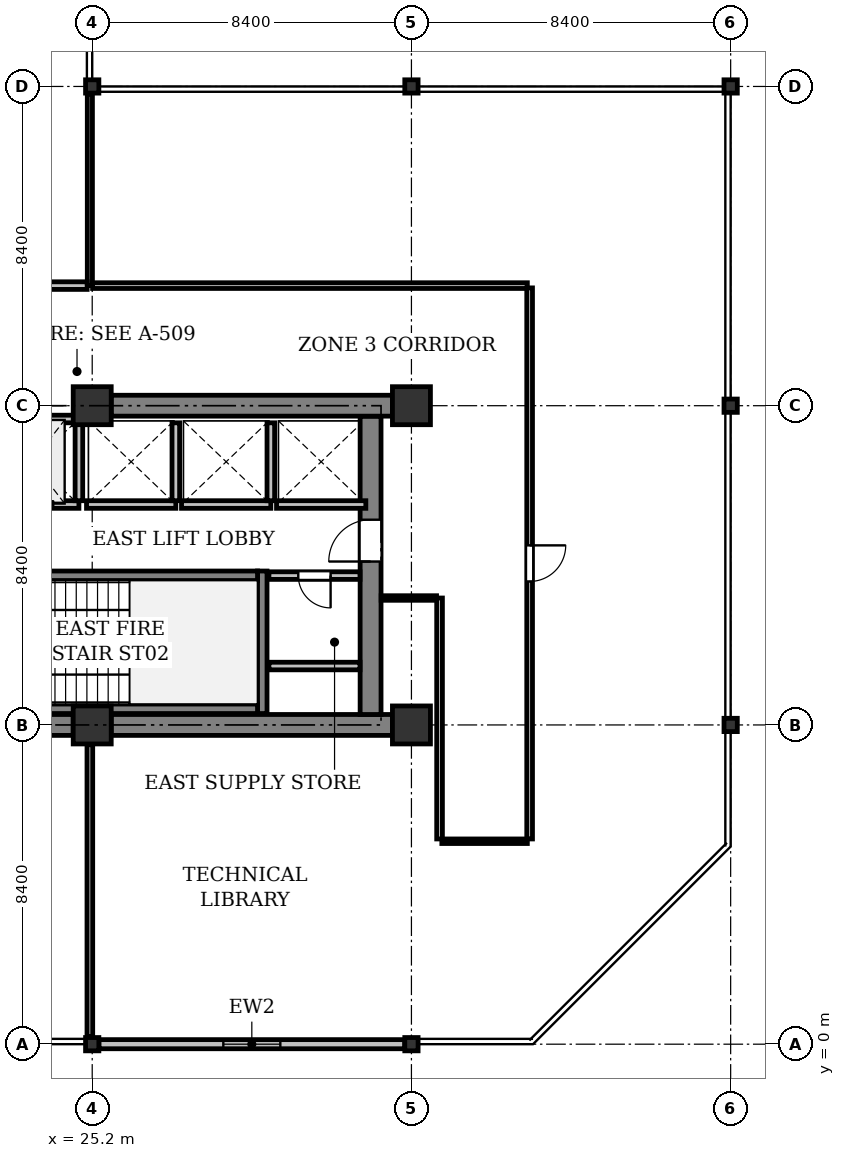
"""IFC4 building model, lengths in metres.
Left out: names, types, materials, properties, quantities, classifications, styles, units other than length and angle.
Written with IfcOpenShell. Run it as: python <this file> out.ifc"""

import sys

from ifc_helpers import new_model, si_unit, direction, frame, frame_2d, origin, origin_2d, place, context, subcontext, project, spatial, rectangle, i_section, extrude, element, fill, save


model = new_model("IFC4")
c1 = context("Model", 3, precision=1e-05, world=origin(), true_north=direction((0.0, 1.0)))
c2 = subcontext(c1, "Body", "Model", "MODEL_VIEW")
j1 = project(units=[si_unit("LENGTHUNIT", "METRE"), si_unit("PLANEANGLEUNIT", "RADIAN")], contexts=[c1])
p1 = place(None, origin())
s1 = spatial("IfcSite", under=j1, at=p1, CompositionType="ELEMENT")
p2 = place(p1, origin())
s2 = spatial("IfcBuilding", under=s1, at=p2, CompositionType="ELEMENT")
p3 = place(p2, frame((0.0, 0.0, 183.7)))
s3 = spatial("IfcBuildingStorey", under=s2, at=p3, CompositionType="ELEMENT", Elevation=183.7)
p4 = place(p3, frame((25.2, 0.0, 0.0), z_axis=(0.0, 0.0, 1.0), x_axis=(1.0, 0.0, 0.0)))
e1 = element("IfcColumn", 1, at=p4, inside=s3, PredefinedType="COLUMN", context=c2, shape_type="SweptSolid", body=[
    extrude(i_section(OverallWidth=0.35, OverallDepth=0.35, WebThickness=0.02, FlangeThickness=0.032, at=origin_2d()), origin(), (0.0, 0.0, 1.0), 4.1),
])
for number, where, z_axis, x_axis in (
    (2, (25.2, 8.4, 0.0), (0.0, 0.0, 1.0), (1.0, 0.0, 0.0)),
    (3, (25.2, 16.8, 0.0), (0.0, 0.0, 1.0), (1.0, 0.0, 0.0)),
):
    element("IfcColumn", number, at=place(p3, frame(where, z_axis=z_axis, x_axis=x_axis)), inside=s3, PredefinedType="COLUMN", context=c2, shape_type="SweptSolid", body=[
        extrude(rectangle(XDim=1.0, YDim=1.0, at=origin_2d()), origin(), (0.0, 0.0, 1.0), 4.1),
    ])
for number, where, z_axis, x_axis in (
    (4, (25.2, 25.2, 0.0), (0.0, 0.0, 1.0), (1.0, 0.0, 0.0)),
    (5, (33.6, 0.0, 0.0), (0.0, 0.0, 1.0), (1.0, 0.0, 0.0)),
):
    element("IfcColumn", number, at=place(p3, frame(where, z_axis=z_axis, x_axis=x_axis)), inside=s3, PredefinedType="COLUMN", context=c2, shape_type="SweptSolid", body=[
        extrude(i_section(OverallWidth=0.35, OverallDepth=0.35, WebThickness=0.02, FlangeThickness=0.032, at=origin_2d()), origin(), (0.0, 0.0, 1.0), 4.1),
    ])
for number, where, z_axis, x_axis in (
    (6, (33.6, 8.4, 0.0), (0.0, 0.0, 1.0), (1.0, 0.0, 0.0)),
    (7, (33.6, 16.8, 0.0), (0.0, 0.0, 1.0), (1.0, 0.0, 0.0)),
):
    element("IfcColumn", number, at=place(p3, frame(where, z_axis=z_axis, x_axis=x_axis)), inside=s3, PredefinedType="COLUMN", context=c2, shape_type="SweptSolid", body=[
        extrude(rectangle(XDim=1.0, YDim=1.0, at=origin_2d()), origin(), (0.0, 0.0, 1.0), 4.1),
    ])
for number, where, z_axis, x_axis in (
    (8, (33.6, 25.2, 0.0), (0.0, 0.0, 1.0), (1.0, 0.0, 0.0)),
    (9, (42.0, 8.4, 0.0), (0.0, 0.0, 1.0), (1.0, 0.0, 0.0)),
    (10, (42.0, 16.8, 0.0), (0.0, 0.0, 1.0), (1.0, 0.0, 0.0)),
    (11, (42.0, 25.2, 0.0), (0.0, 0.0, 1.0), (1.0, 0.0, 0.0)),
):
    element("IfcColumn", number, at=place(p3, frame(where, z_axis=z_axis, x_axis=x_axis)), inside=s3, PredefinedType="COLUMN", context=c2, shape_type="SweptSolid", body=[
        extrude(i_section(OverallWidth=0.35, OverallDepth=0.35, WebThickness=0.02, FlangeThickness=0.032, at=origin_2d()), origin(), (0.0, 0.0, 1.0), 4.1),
    ])
p5 = place(p3, frame((33.425, 0.0, 0.0), z_axis=(0.0, 0.0, 1.0), x_axis=(-1.0, 0.0, 0.0)))
e12 = element("IfcWall", 12, at=p5, inside=s3, PredefinedType="STANDARD", context=c2, shape_type="SweptSolid", body=[
    extrude(rectangle(XDim=8.05, YDim=0.24, at=frame_2d((4.025, 0.0))), origin(), (0.0, 0.0, 1.0), 3.525),
])
p6 = place(p5, frame((3.275, 0.0, 0.9)))
e13 = element("IfcOpeningElement", 13, at=p6, cuts=e12, PredefinedType="OPENING", context=c2, shape_type="SweptSolid", body=[
    extrude(rectangle(XDim=1.5, YDim=1.6, at=frame_2d((0.75, 0.8))), frame((0.0, 0.13, 0.0), z_axis=(0.0, -1.0, 0.0), x_axis=(1.0, 0.0, 0.0)), (0.0, 0.0, 1.0), 0.26),
])
p7 = place(p3, frame((17.3, 8.4, 0.0), z_axis=(0.0, 0.0, 1.0), x_axis=(1.0, 0.0, 0.0)))
e14 = element("IfcWall", 14, at=p7, inside=s3, PredefinedType="SHEAR", context=c2, shape_type="SweptSolid", body=[
    extrude(rectangle(XDim=7.4, YDim=0.55, at=frame_2d((3.7, 0.0))), origin(), (0.0, 0.0, 1.0), 3.825),
])
p8 = place(p3, frame((25.7, 8.4, 0.0), z_axis=(0.0, 0.0, 1.0), x_axis=(1.0, 0.0, 0.0)))
e15 = element("IfcWall", 15, at=p8, inside=s3, PredefinedType="SHEAR", context=c2, shape_type="SweptSolid", body=[
    extrude(rectangle(XDim=7.4, YDim=0.55, at=frame_2d((3.7, 0.0))), origin(), (0.0, 0.0, 1.0), 3.825),
])
p9 = place(p3, frame((32.525, 8.675, 0.0), z_axis=(0.0, 0.0, 1.0), x_axis=(0.0, 1.0, 0.0)))
e16 = element("IfcWall", 16, at=p9, inside=s3, PredefinedType="SHEAR", context=c2, shape_type="SweptSolid", body=[
    extrude(rectangle(XDim=7.85, YDim=0.55, at=frame_2d((3.925, 0.0))), origin(), (0.0, 0.0, 1.0), 3.825),
])
p10 = place(p9, frame((4.025, 0.0, 0.0)))
e17 = element("IfcOpeningElement", 17, at=p10, cuts=e16, PredefinedType="OPENING", context=c2, shape_type="SweptSolid", body=[
    extrude(rectangle(XDim=1.1, YDim=2.15, at=frame_2d((0.55, 1.075))), frame((0.0, 0.285, 0.0), z_axis=(0.0, -1.0, 0.0), x_axis=(1.0, 0.0, 0.0)), (0.0, 0.0, 1.0), 0.57),
])
p11 = place(p3, frame((25.7, 16.8, 0.0), z_axis=(0.0, 0.0, 1.0), x_axis=(1.0, 0.0, 0.0)))
e18 = element("IfcWall", 18, at=p11, inside=s3, PredefinedType="SHEAR", context=c2, shape_type="SweptSolid", body=[
    extrude(rectangle(XDim=7.4, YDim=0.55, at=frame_2d((3.7, 0.0))), origin(), (0.0, 0.0, 1.0), 3.825),
])
p12 = place(p3, frame((29.675, 8.7, 0.0), z_axis=(0.0, 0.0, 1.0), x_axis=(0.0, 1.0, 0.0)))
e19 = element("IfcWall", 19, at=p12, inside=s3, PredefinedType="SHEAR", context=c2, shape_type="SweptSolid", body=[
    extrude(rectangle(XDim=3.75, YDim=0.25, at=frame_2d((1.875, 0.0))), origin(), (0.0, 0.0, 1.0), 3.825),
])
p13 = place(p3, frame((21.8, 8.825, 0.0), z_axis=(0.0, 0.0, 1.0), x_axis=(1.0, 0.0, 0.0)))
e20 = element("IfcWall", 20, at=p13, inside=s3, PredefinedType="SHEAR", context=c2, shape_type="SweptSolid", body=[
    extrude(rectangle(XDim=7.75, YDim=0.25, at=frame_2d((3.875, 0.0))), origin(), (0.0, 0.0, 1.0), 3.825),
])
p14 = place(p3, frame((21.8, 12.325, 0.0), z_axis=(0.0, 0.0, 1.0), x_axis=(1.0, 0.0, 0.0)))
e21 = element("IfcWall", 21, at=p14, inside=s3, PredefinedType="SHEAR", context=c2, shape_type="SweptSolid", body=[
    extrude(rectangle(XDim=7.75, YDim=0.25, at=frame_2d((3.875, 0.0))), origin(), (0.0, 0.0, 1.0), 3.825),
])
p15 = place(p14, frame((0.22, 0.0, 0.0)))
e22 = element("IfcOpeningElement", 22, at=p15, cuts=e21, PredefinedType="OPENING", context=c2, shape_type="SweptSolid", body=[
    extrude(rectangle(XDim=1.1, YDim=2.15, at=frame_2d((0.55, 1.075))), frame((0.0, 0.135, 0.0), z_axis=(0.0, -1.0, 0.0), x_axis=(1.0, 0.0, 0.0)), (0.0, 0.0, 1.0), 0.27),
])
p16 = place(p3, frame((22.4, 14.2, 0.0), z_axis=(0.0, 0.0, 1.0), x_axis=(1.0, 0.0, 0.0)))
e23 = element("IfcWall", 23, at=p16, inside=s3, PredefinedType="PARTITIONING", context=c2, shape_type="SweptSolid", body=[
    extrude(rectangle(XDim=2.45, YDim=0.2, at=frame_2d((1.225, 0.0))), origin(), (0.0, 0.0, 1.0), 3.825),
])
p17 = place(p16, frame((0.675, 0.0, 0.0)))
e24 = element("IfcOpeningElement", 24, at=p17, cuts=e23, PredefinedType="OPENING", context=c2, shape_type="SweptSolid", body=[
    extrude(rectangle(XDim=1.1, YDim=2.2, at=frame_2d((0.55, 1.1))), frame((0.0, 0.11, 0.0), z_axis=(0.0, -1.0, 0.0), x_axis=(1.0, 0.0, 0.0)), (0.0, 0.0, 1.0), 0.22),
])
p18 = place(p3, frame((24.85, 14.3, 0.0), z_axis=(0.0, 0.0, 1.0), x_axis=(0.0, 1.0, 0.0)))
e25 = element("IfcWall", 25, at=p18, inside=s3, PredefinedType="PARTITIONING", context=c2, shape_type="SweptSolid", body=[
    extrude(rectangle(XDim=2.05, YDim=0.2, at=frame_2d((1.025, 0.0))), origin(), (0.0, 0.0, 1.0), 3.825),
])
p19 = place(p3, frame((22.5, 16.45, 0.0), z_axis=(0.0, 0.0, 1.0), x_axis=(1.0, 0.0, 0.0)))
e26 = element("IfcWall", 26, at=p19, inside=s3, PredefinedType="PARTITIONING", context=c2, shape_type="SweptSolid", body=[
    extrude(rectangle(XDim=2.25, YDim=0.2, at=frame_2d((1.125, 0.0))), origin(), (0.0, 0.0, 1.0), 3.825),
])
p20 = place(p3, frame((25.05, 14.2, 0.0), z_axis=(0.0, 0.0, 1.0), x_axis=(1.0, 0.0, 0.0)))
e27 = element("IfcWall", 27, at=p20, inside=s3, PredefinedType="PARTITIONING", context=c2, shape_type="SweptSolid", body=[
    extrude(rectangle(XDim=2.35, YDim=0.2, at=frame_2d((1.175, 0.0))), origin(), (0.0, 0.0, 1.0), 3.825),
])
p21 = place(p3, frame((27.4, 14.3, 0.0), z_axis=(0.0, 0.0, 1.0), x_axis=(0.0, 1.0, 0.0)))
e28 = element("IfcWall", 28, at=p21, inside=s3, PredefinedType="PARTITIONING", context=c2, shape_type="SweptSolid", body=[
    extrude(rectangle(XDim=2.05, YDim=0.2, at=frame_2d((1.025, 0.0))), origin(), (0.0, 0.0, 1.0), 3.825),
])
p22 = place(p3, frame((27.55, 14.2, 0.0), z_axis=(0.0, 0.0, 1.0), x_axis=(1.0, 0.0, 0.0)))
e29 = element("IfcWall", 29, at=p22, inside=s3, PredefinedType="PARTITIONING", context=c2, shape_type="SweptSolid", body=[
    extrude(rectangle(XDim=2.35, YDim=0.2, at=frame_2d((1.175, 0.0))), origin(), (0.0, 0.0, 1.0), 3.825),
])
p23 = place(p3, frame((29.9, 14.3, 0.0), z_axis=(0.0, 0.0, 1.0), x_axis=(0.0, 1.0, 0.0)))
e30 = element("IfcWall", 30, at=p23, inside=s3, PredefinedType="PARTITIONING", context=c2, shape_type="SweptSolid", body=[
    extrude(rectangle(XDim=2.05, YDim=0.2, at=frame_2d((1.025, 0.0))), origin(), (0.0, 0.0, 1.0), 3.825),
])
p24 = place(p3, frame((30.05, 14.2, 0.0), z_axis=(0.0, 0.0, 1.0), x_axis=(1.0, 0.0, 0.0)))
e31 = element("IfcWall", 31, at=p24, inside=s3, PredefinedType="PARTITIONING", context=c2, shape_type="SweptSolid", body=[
    extrude(rectangle(XDim=2.35, YDim=0.2, at=frame_2d((1.175, 0.0))), origin(), (0.0, 0.0, 1.0), 3.825),
])
p25 = place(p3, frame((32.246, 12.33, 0.0), z_axis=(0.0, 0.0, 1.0), x_axis=(-1.0, 0.0, 0.0)))
e32 = element("IfcWall", 32, at=p25, inside=s3, PredefinedType="PARTITIONING", context=c2, shape_type="SweptSolid", body=[
    extrude(rectangle(XDim=2.396, YDim=0.2, at=frame_2d((1.198, 0.0))), origin(), (0.0, 0.0, 1.0), 3.825),
])
p26 = place(p25, frame((0.773, 0.0, 0.0)))
e33 = element("IfcOpeningElement", 33, at=p26, cuts=e32, PredefinedType="OPENING", context=c2, shape_type="SweptSolid", body=[
    extrude(rectangle(XDim=0.85, YDim=2.15, at=frame_2d((0.425, 1.075))), frame((0.0, 0.11, 0.0), z_axis=(0.0, -1.0, 0.0), x_axis=(1.0, 0.0, 0.0)), (0.0, 0.0, 1.0), 0.22),
])
p27 = place(p3, frame((29.85, 9.95, 0.0), z_axis=(0.0, 0.0, 1.0), x_axis=(1.0, 0.0, 0.0)))
e34 = element("IfcWall", 34, at=p27, inside=s3, PredefinedType="PARTITIONING", context=c2, shape_type="SweptSolid", body=[
    extrude(rectangle(XDim=2.396, YDim=0.2, at=frame_2d((1.198, 0.0))), origin(), (0.0, 0.0, 1.0), 3.825),
])
p28 = place(p3, frame((25.138, 0.195, 0.0), z_axis=(0.0, 0.0, 1.0), x_axis=(0.0, 1.0, 0.0)))
e35 = element("IfcWall", 35, at=p28, inside=s3, PredefinedType="PARTITIONING", context=c2, shape_type="SweptSolid", body=[
    extrude(rectangle(XDim=7.685, YDim=0.15, at=frame_2d((3.842, 0.0))), origin(), (0.0, 0.0, 1.0), 3.371),
])
p29 = place(p3, frame((25.138, 25.005, 0.0), z_axis=(0.0, 0.0, 1.0), x_axis=(0.0, -1.0, 0.0)))
e36 = element("IfcWall", 36, at=p29, inside=s3, PredefinedType="PARTITIONING", context=c2, shape_type="SweptSolid", body=[
    extrude(rectangle(XDim=5.045, YDim=0.135, at=frame_2d((2.522, 0.0))), origin(), (0.0, 0.0, 1.0), 3.371),
])
p30 = place(p3, frame((25.209, 19.96, 0.0), z_axis=(0.0, 0.0, 1.0), x_axis=(1.0, 0.0, 0.0)))
e37 = element("IfcWall", 37, at=p30, inside=s3, PredefinedType="PARTITIONING", context=c2, shape_type="SweptSolid", body=[
    extrude(rectangle(XDim=11.44, YDim=0.15, at=frame_2d((5.72, 0.0))), origin(), (0.0, 0.0, 1.0), 3.371),
])
p31 = place(p3, frame((36.71, 19.9, 0.0), z_axis=(0.0, 0.0, 1.0), x_axis=(0.0, -1.0, 0.0)))
e38 = element("IfcWall", 38, at=p31, inside=s3, PredefinedType="PARTITIONING", context=c2, shape_type="SweptSolid", body=[
    extrude(rectangle(XDim=14.5, YDim=0.15, at=frame_2d((7.25, 0.0))), origin(), (0.0, 0.0, 1.0), 3.365),
])
p32 = place(p31, frame((6.775, 0.0, 0.0)))
e39 = element("IfcOpeningElement", 39, at=p32, cuts=e38, PredefinedType="OPENING", context=c2, shape_type="SweptSolid", body=[
    extrude(rectangle(XDim=0.95, YDim=2.15, at=frame_2d((0.475, 1.075))), frame((0.0, 0.085, 0.0), z_axis=(0.0, -1.0, 0.0), x_axis=(1.0, 0.0, 0.0)), (0.0, 0.0, 1.0), 0.17),
])
p33 = place(p3, frame((36.65, 5.34, 0.0), z_axis=(0.0, 0.0, 1.0), x_axis=(-1.0, 0.0, 0.0)))
e40 = element("IfcWall", 40, at=p33, inside=s3, PredefinedType="PARTITIONING", context=c2, shape_type="SweptSolid", body=[
    extrude(rectangle(XDim=2.25, YDim=0.12, at=frame_2d((1.125, 0.0))), origin(), (0.0, 0.0, 1.0), 3.825),
])
p34 = place(p3, frame((34.34, 5.4, 0.0), z_axis=(0.0, 0.0, 1.0), x_axis=(0.0, 1.0, 0.0)))
e41 = element("IfcWall", 41, at=p34, inside=s3, PredefinedType="PARTITIONING", context=c2, shape_type="SweptSolid", body=[
    extrude(rectangle(XDim=6.34, YDim=0.15, at=frame_2d((3.17, 0.0))), origin(), (0.0, 0.0, 1.0), 3.365),
])
p35 = place(p3, frame((34.261, 11.74, 0.0), z_axis=(0.0, 0.0, 1.0), x_axis=(-1.0, 0.0, 0.0)))
e42 = element("IfcWall", 42, at=p35, inside=s3, PredefinedType="PARTITIONING", context=c2, shape_type="SweptSolid", body=[
    extrude(rectangle(XDim=1.457, YDim=0.12, at=frame_2d((0.729, 0.0))), origin(), (0.0, 0.0, 1.0), 3.371),
])
p36 = place(p3, frame((7.814, 19.96, 0.0), z_axis=(0.0, 0.0, 1.0), x_axis=(1.0, 0.0, 0.0)))
e43 = element("IfcWall", 43, at=p36, inside=s3, PredefinedType="PARTITIONING", context=c2, shape_type="SweptSolid", body=[
    extrude(rectangle(XDim=17.252, YDim=0.2, at=frame_2d((8.626, 0.0))), origin(), (0.0, 0.0, 1.0), 3.371),
])
p37 = place(p36, frame((8.126, 0.0, 0.0)))
e44 = element("IfcOpeningElement", 44, at=p37, cuts=e43, PredefinedType="OPENING", context=c2, shape_type="SweptSolid", body=[
    extrude(rectangle(XDim=1.0, YDim=2.15, at=frame_2d((0.5, 1.075))), frame((0.0, 0.11, 0.0), z_axis=(0.0, -1.0, 0.0), x_axis=(1.0, 0.0, 0.0)), (0.0, 0.0, 1.0), 0.22),
])
p38 = place(p6, origin())
e45 = element("IfcWindow", 45, at=p38, inside=s3, PartitioningType="SINGLE_PANEL", PredefinedType="WINDOW", context=c2, shape_type="SweptSolid", body=[
    extrude(rectangle(XDim=1.5, YDim=1.6, at=frame_2d((0.75, 0.8))), frame((0.0, 0.03, 0.0), z_axis=(0.0, -1.0, 0.0), x_axis=(1.0, 0.0, 0.0)), (0.0, 0.0, 1.0), 0.06),
])
fill(e13, e45)
p39 = place(p10, origin())
e46 = element("IfcDoor", 46, at=p39, inside=s3, OperationType="SINGLE_SWING_LEFT", PredefinedType="DOOR", context=c2, shape_type="SweptSolid", body=[
    extrude(rectangle(XDim=1.1, YDim=2.15, at=frame_2d((0.55, 1.075))), frame((0.0, 0.025, 0.0), z_axis=(0.0, -1.0, 0.0), x_axis=(1.0, 0.0, 0.0)), (0.0, 0.0, 1.0), 0.05),
])
fill(e17, e46)
p40 = place(p17, origin())
e47 = element("IfcDoor", 47, at=p40, inside=s3, OperationType="DOUBLE_DOOR_SLIDING", PredefinedType="DOOR", context=c2, shape_type="SweptSolid", body=[
    extrude(rectangle(XDim=1.1, YDim=2.2, at=frame_2d((0.55, 1.1))), frame((0.0, 0.025, 0.0), z_axis=(0.0, -1.0, 0.0), x_axis=(1.0, 0.0, 0.0)), (0.0, 0.0, 1.0), 0.05),
])
fill(e24, e47)
p41 = place(p26, origin())
e48 = element("IfcDoor", 48, at=p41, inside=s3, OperationType="SINGLE_SWING_LEFT", PredefinedType="DOOR", context=c2, shape_type="SweptSolid", body=[
    extrude(rectangle(XDim=0.85, YDim=2.15, at=frame_2d((0.425, 1.075))), frame((0.0, 0.025, 0.0), z_axis=(0.0, -1.0, 0.0), x_axis=(1.0, 0.0, 0.0)), (0.0, 0.0, 1.0), 0.05),
])
fill(e33, e48)
p42 = place(p32, origin())
e49 = element("IfcDoor", 49, at=p42, inside=s3, OperationType="SINGLE_SWING_LEFT", PredefinedType="DOOR", context=c2, shape_type="SweptSolid", body=[
    extrude(rectangle(XDim=0.95, YDim=2.15, at=frame_2d((0.475, 1.075))), frame((0.0, 0.025, 0.0), z_axis=(0.0, -1.0, 0.0), x_axis=(1.0, 0.0, 0.0)), (0.0, 0.0, 1.0), 0.05),
])
fill(e39, e49)
save(model, sys.argv[1])
